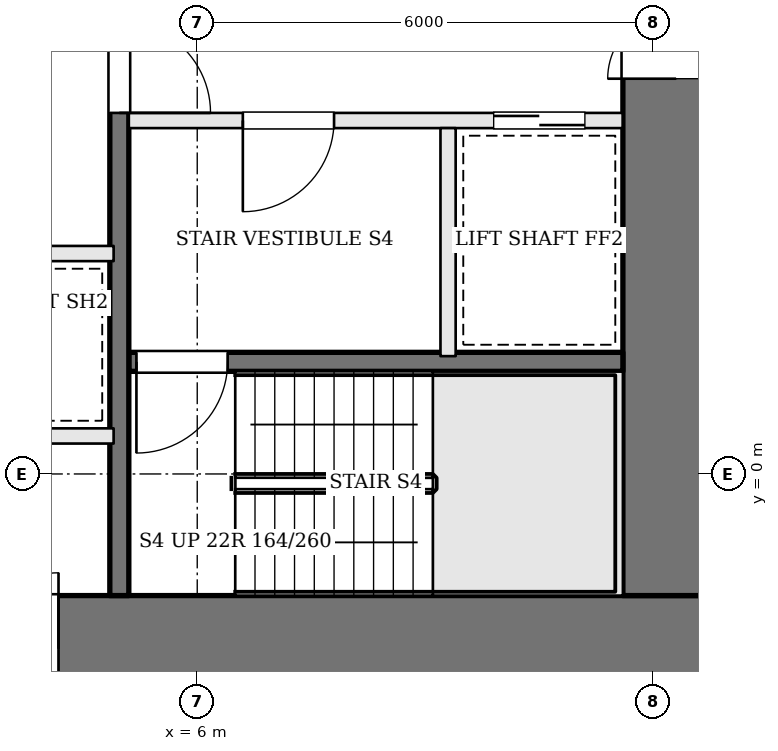
"""IFC4 building model, lengths in metres.
Left out: names, types, materials, properties, quantities, classifications, styles, units other than length and angle.
Written with IfcOpenShell. Run it as: python <this file> out.ifc"""

import sys

from ifc_helpers import new_model, si_unit, direction, frame, frame_2d, origin, place, context, subcontext, project, spatial, rectangle, extrude, element, fill, save


model = new_model("IFC4")
c1 = context("Model", 3, precision=1e-05, world=origin(), true_north=direction((0.0, 1.0)))
c2 = subcontext(c1, "Body", "Model", "MODEL_VIEW")
j1 = project(units=[si_unit("LENGTHUNIT", "METRE"), si_unit("PLANEANGLEUNIT", "RADIAN")], contexts=[c1])
p1 = place(None, origin())
s1 = spatial("IfcSite", under=j1, at=p1, CompositionType="ELEMENT")
p2 = place(p1, origin())
s2 = spatial("IfcBuilding", under=s1, at=p2, CompositionType="ELEMENT")
p3 = place(p2, frame((0.0, 0.0, 51.9)))
s3 = spatial("IfcBuildingStorey", under=s2, at=p3, CompositionType="ELEMENT", Elevation=51.9)
p4 = place(p3, frame((-13.0, -2.3, 0.0), z_axis=(0.0, 0.0, 1.0), x_axis=(1.0, 0.0, 0.0)))
e1 = element("IfcWall", 1, at=p4, inside=s3, PredefinedType="SHEAR", context=c2, shape_type="SweptSolid", body=[
    extrude(rectangle(XDim=26.0, YDim=1.4, at=frame_2d((13.0, 0.0))), origin(), (0.0, 0.0, 1.0), 3.6),
])
p5 = place(p4, frame((8.575, 0.0, 0.0)))
e2 = element("IfcOpeningElement", 2, at=p5, cuts=e1, PredefinedType="OPENING", context=c2, shape_type="SweptSolid", body=[
    extrude(rectangle(XDim=0.7, YDim=2.1, at=frame_2d((0.35, 1.05))), frame((0.0, 0.71, 0.0), z_axis=(0.0, -1.0, 0.0), x_axis=(1.0, 0.0, 0.0)), (0.0, 0.0, 1.0), 1.42),
])
p6 = place(p4, frame((10.475, 0.0, 0.0)))
e3 = element("IfcOpeningElement", 3, at=p6, cuts=e1, PredefinedType="OPENING", context=c2, shape_type="SweptSolid", body=[
    extrude(rectangle(XDim=1.0, YDim=2.1, at=frame_2d((0.5, 1.05))), frame((0.0, 0.71, 0.0), z_axis=(0.0, -1.0, 0.0), x_axis=(1.0, 0.0, 0.0)), (0.0, 0.0, 1.0), 1.42),
])
p7 = place(p4, frame((13.325, 0.0, 0.0)))
e4 = element("IfcOpeningElement", 4, at=p7, cuts=e1, PredefinedType="OPENING", context=c2, shape_type="SweptSolid", body=[
    extrude(rectangle(XDim=1.0, YDim=2.1, at=frame_2d((0.5, 1.05))), frame((0.0, 0.71, 0.0), z_axis=(0.0, -1.0, 0.0), x_axis=(1.0, 0.0, 0.0)), (0.0, 0.0, 1.0), 1.42),
])
p8 = place(p4, frame((16.175, 0.0, 0.0)))
e5 = element("IfcOpeningElement", 5, at=p8, cuts=e1, PredefinedType="OPENING", context=c2, shape_type="SweptSolid", body=[
    extrude(rectangle(XDim=1.0, YDim=2.1, at=frame_2d((0.5, 1.05))), frame((0.0, 0.71, 0.0), z_axis=(0.0, -1.0, 0.0), x_axis=(1.0, 0.0, 0.0)), (0.0, 0.0, 1.0), 1.42),
])
p9 = place(p3, frame((12.3, -1.6, 0.0), z_axis=(0.0, 0.0, 1.0), x_axis=(0.0, 1.0, 0.0)))
e6 = element("IfcWall", 6, at=p9, inside=s3, PredefinedType="SHEAR", context=c2, shape_type="SweptSolid", body=[
    extrude(rectangle(XDim=12.2, YDim=1.4, at=frame_2d((6.1, 0.0))), origin(), (0.0, 0.0, 1.0), 3.6),
])
p10 = place(p9, frame((6.8, 0.0, 0.0)))
e7 = element("IfcOpeningElement", 7, at=p10, cuts=e6, PredefinedType="OPENING", context=c2, shape_type="SweptSolid", body=[
    extrude(rectangle(XDim=1.8, YDim=2.1, at=frame_2d((0.9, 1.05))), frame((0.0, 0.71, 0.0), z_axis=(0.0, -1.0, 0.0), x_axis=(1.0, 0.0, 0.0)), (0.0, 0.0, 1.0), 1.42),
])
p11 = place(p3, frame((11.6, 4.65, 0.0), z_axis=(0.0, 0.0, 1.0), x_axis=(-1.0, 0.0, 0.0)))
e8 = element("IfcWall", 8, at=p11, inside=s3, PredefinedType="SOLIDWALL", context=c2, shape_type="SweptSolid", body=[
    extrude(rectangle(XDim=6.5, YDim=0.2, at=frame_2d((3.25, 0.0))), origin(), (0.0, 0.0, 1.0), 3.4),
])
p12 = place(p11, frame((3.8, 0.0, 0.0)))
e9 = element("IfcOpeningElement", 9, at=p12, cuts=e8, PredefinedType="OPENING", context=c2, shape_type="SweptSolid", body=[
    extrude(rectangle(XDim=1.2, YDim=2.1, at=frame_2d((0.6, 1.05))), frame((0.0, 0.11, 0.0), z_axis=(0.0, -1.0, 0.0), x_axis=(1.0, 0.0, 0.0)), (0.0, 0.0, 1.0), 0.22),
])
p13 = place(p11, frame((0.5, 0.0, 0.0)))
e10 = element("IfcOpeningElement", 10, at=p13, cuts=e8, PredefinedType="OPENING", context=c2, shape_type="SweptSolid", body=[
    extrude(rectangle(XDim=1.2, YDim=2.1, at=frame_2d((0.6, 1.05))), frame((0.0, 0.11, 0.0), z_axis=(0.0, -1.0, 0.0), x_axis=(1.0, 0.0, 0.0)), (0.0, 0.0, 1.0), 0.22),
])
p14 = place(p3, frame((11.6, 1.475, 0.0), z_axis=(0.0, 0.0, 1.0), x_axis=(-1.0, 0.0, 0.0)))
e11 = element("IfcWall", 11, at=p14, inside=s3, PredefinedType="SOLIDWALL", context=c2, shape_type="SweptSolid", body=[
    extrude(rectangle(XDim=6.5, YDim=0.25, at=frame_2d((3.25, 0.0))), origin(), (0.0, 0.0, 1.0), 3.4),
])
p15 = place(p14, frame((5.2, 0.0, 0.0)))
e12 = element("IfcOpeningElement", 12, at=p15, cuts=e11, PredefinedType="OPENING", context=c2, shape_type="SweptSolid", body=[
    extrude(rectangle(XDim=1.2, YDim=2.1, at=frame_2d((0.6, 1.05))), frame((0.0, 0.135, 0.0), z_axis=(0.0, -1.0, 0.0), x_axis=(1.0, 0.0, 0.0)), (0.0, 0.0, 1.0), 0.27),
])
p16 = place(p3, frame((9.3, 4.55, 0.0), z_axis=(0.0, 0.0, 1.0), x_axis=(0.0, -1.0, 0.0)))
e13 = element("IfcWall", 13, at=p16, inside=s3, PredefinedType="SOLIDWALL", context=c2, shape_type="SweptSolid", body=[
    extrude(rectangle(XDim=3.0, YDim=0.2, at=frame_2d((1.5, 0.0))), origin(), (0.0, 0.0, 1.0), 3.4),
])
p17 = place(p3, frame((4.975, 10.6, 0.0), z_axis=(0.0, 0.0, 1.0), x_axis=(0.0, -1.0, 0.0)))
e14 = element("IfcWall", 14, at=p17, inside=s3, PredefinedType="SOLIDWALL", context=c2, shape_type="SweptSolid", body=[
    extrude(rectangle(XDim=12.2, YDim=0.25, at=frame_2d((6.1, 0.0))), origin(), (0.0, 0.0, 1.0), 3.4),
])
p18 = place(p17, frame((4.65, 0.0, 0.0)))
e15 = element("IfcOpeningElement", 15, at=p18, cuts=e14, PredefinedType="OPENING", context=c2, shape_type="SweptSolid", body=[
    extrude(rectangle(XDim=1.2, YDim=2.1, at=frame_2d((0.6, 1.05))), frame((0.0, 0.135, 0.0), z_axis=(0.0, -1.0, 0.0), x_axis=(1.0, 0.0, 0.0)), (0.0, 0.0, 1.0), 0.27),
])
p19 = place(p3, frame((-4.9, 0.5, 0.0), z_axis=(0.0, 0.0, 1.0), x_axis=(1.0, 0.0, 0.0)))
e16 = element("IfcWall", 16, at=p19, inside=s3, PredefinedType="SOLIDWALL", context=c2, shape_type="SweptSolid", body=[
    extrude(rectangle(XDim=9.8, YDim=0.2, at=frame_2d((4.9, 0.0))), origin(), (0.0, 0.0, 1.0), 3.4),
])
p20 = place(p3, frame((-4.9, 2.9, 0.0), z_axis=(0.0, 0.0, 1.0), x_axis=(1.0, 0.0, 0.0)))
e17 = element("IfcWall", 17, at=p20, inside=s3, PredefinedType="SOLIDWALL", context=c2, shape_type="SweptSolid", body=[
    extrude(rectangle(XDim=9.8, YDim=0.2, at=frame_2d((4.9, 0.0))), origin(), (0.0, 0.0, 1.0), 3.4),
])
p21 = place(p20, frame((0.675, 0.0, 0.0)))
e18 = element("IfcOpeningElement", 18, at=p21, cuts=e17, PredefinedType="OPENING", context=c2, shape_type="SweptSolid", body=[
    extrude(rectangle(XDim=1.1, YDim=2.1, at=frame_2d((0.55, 1.05))), frame((0.0, 0.11, 0.0), z_axis=(0.0, -1.0, 0.0), x_axis=(1.0, 0.0, 0.0)), (0.0, 0.0, 1.0), 0.22),
])
p22 = place(p20, frame((3.125, 0.0, 0.0)))
e19 = element("IfcOpeningElement", 19, at=p22, cuts=e17, PredefinedType="OPENING", context=c2, shape_type="SweptSolid", body=[
    extrude(rectangle(XDim=1.1, YDim=2.1, at=frame_2d((0.55, 1.05))), frame((0.0, 0.11, 0.0), z_axis=(0.0, -1.0, 0.0), x_axis=(1.0, 0.0, 0.0)), (0.0, 0.0, 1.0), 0.22),
])
p23 = place(p10, origin())
e20 = element("IfcDoor", 20, at=p23, inside=s3, OperationType="DOUBLE_DOOR_SINGLE_SWING", PredefinedType="DOOR", context=c2, shape_type="SweptSolid", body=[
    extrude(rectangle(XDim=1.8, YDim=2.1, at=frame_2d((0.9, 1.05))), frame((0.0, 0.025, 0.0), z_axis=(0.0, -1.0, 0.0), x_axis=(1.0, 0.0, 0.0)), (0.0, 0.0, 1.0), 0.05),
])
fill(e7, e20)
p24 = place(p18, origin())
e21 = element("IfcDoor", 21, at=p24, inside=s3, OperationType="SINGLE_SWING_RIGHT", PredefinedType="DOOR", context=c2, shape_type="SweptSolid", body=[
    extrude(rectangle(XDim=1.2, YDim=2.1, at=frame_2d((0.6, 1.05))), frame((0.0, 0.025, 0.0), z_axis=(0.0, -1.0, 0.0), x_axis=(1.0, 0.0, 0.0)), (0.0, 0.0, 1.0), 0.05),
])
fill(e15, e21)
p25 = place(p12, origin())
e22 = element("IfcDoor", 22, at=p25, inside=s3, OperationType="SINGLE_SWING_RIGHT", PredefinedType="DOOR", context=c2, shape_type="SweptSolid", body=[
    extrude(rectangle(XDim=1.2, YDim=2.1, at=frame_2d((0.6, 1.05))), frame((0.0, 0.025, 0.0), z_axis=(0.0, -1.0, 0.0), x_axis=(1.0, 0.0, 0.0)), (0.0, 0.0, 1.0), 0.05),
])
fill(e9, e22)
p26 = place(p15, origin())
e23 = element("IfcDoor", 23, at=p26, inside=s3, OperationType="SINGLE_SWING_RIGHT", PredefinedType="DOOR", context=c2, shape_type="SweptSolid", body=[
    extrude(rectangle(XDim=1.2, YDim=2.1, at=frame_2d((0.6, 1.05))), frame((0.0, 0.025, 0.0), z_axis=(0.0, -1.0, 0.0), x_axis=(1.0, 0.0, 0.0)), (0.0, 0.0, 1.0), 0.05),
])
fill(e12, e23)
p27 = place(p13, origin())
e24 = element("IfcDoor", 24, at=p27, inside=s3, OperationType="SLIDING_TO_RIGHT", PredefinedType="DOOR", context=c2, shape_type="SweptSolid", body=[
    extrude(rectangle(XDim=1.2, YDim=2.1, at=frame_2d((0.6, 1.05))), frame((0.0, 0.025, 0.0), z_axis=(0.0, -1.0, 0.0), x_axis=(1.0, 0.0, 0.0)), (0.0, 0.0, 1.0), 0.05),
])
fill(e10, e24)
p28 = place(p8, origin())
e25 = element("IfcDoor", 25, at=p28, inside=s3, OperationType="SINGLE_SWING_RIGHT", PredefinedType="DOOR", context=c2, shape_type="SweptSolid", body=[
    extrude(rectangle(XDim=1.0, YDim=2.1, at=frame_2d((0.5, 1.05))), frame((0.0, 0.025, 0.0), z_axis=(0.0, -1.0, 0.0), x_axis=(1.0, 0.0, 0.0)), (0.0, 0.0, 1.0), 0.05),
])
fill(e5, e25)
save(model, sys.argv[1])
